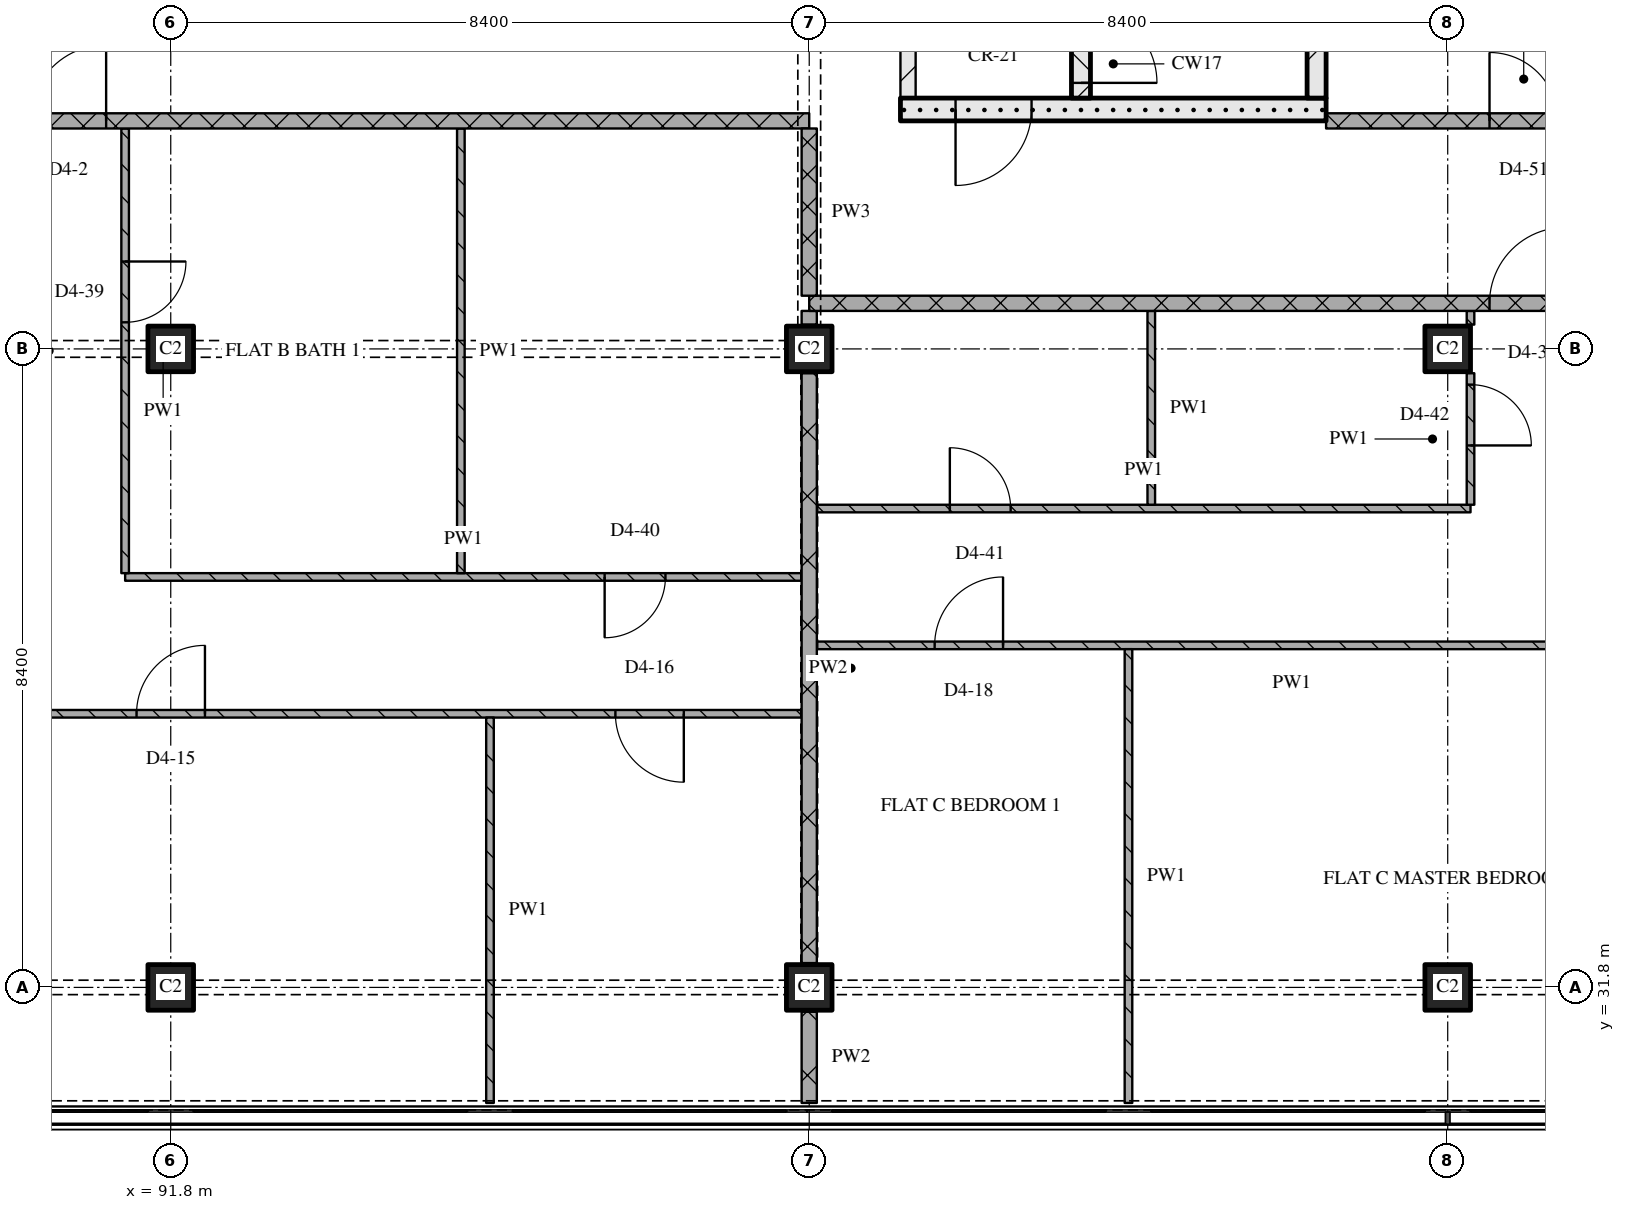
"""IFC4 building model, lengths in metres.
Left out: names, types, materials, properties, quantities, classifications, styles, units other than length and angle.
Written with IfcOpenShell. Run it as: python <this file> out.ifc"""

import sys

from ifc_helpers import new_model, si_unit, direction, frame, frame_2d, origin, origin_2d, place, context, subcontext, project, spatial, rectangle, extrude, element, fill, save


model = new_model("IFC4")
c1 = context("Model", 3, precision=1e-05, world=origin(), true_north=direction((0.0, 1.0)))
c2 = subcontext(c1, "Body", "Model", "MODEL_VIEW")
j1 = project(units=[si_unit("LENGTHUNIT", "METRE"), si_unit("PLANEANGLEUNIT", "RADIAN")], contexts=[c1])
p1 = place(None, origin())
s1 = spatial("IfcSite", under=j1, at=p1, CompositionType="ELEMENT")
p2 = place(p1, origin())
s2 = spatial("IfcBuilding", under=s1, at=p2, CompositionType="ELEMENT")
p3 = place(p2, frame((0.0, 0.0, 245.1)))
s3 = spatial("IfcBuildingStorey", under=s2, at=p3, CompositionType="ELEMENT", Elevation=245.1)
for number, where, z_axis, x_axis in (
    (1, (91.8, 31.8, 0.0), (0.0, 0.0, 1.0), (1.0, 0.0, 0.0)),
    (2, (91.8, 40.2, 0.0), (0.0, 0.0, 1.0), (1.0, 0.0, 0.0)),
    (3, (100.2, 31.8, 0.0), (0.0, 0.0, 1.0), (1.0, 0.0, 0.0)),
    (4, (100.2, 40.2, 0.0), (0.0, 0.0, 1.0), (1.0, 0.0, 0.0)),
    (5, (108.6, 31.8, 0.0), (0.0, 0.0, 1.0), (1.0, 0.0, 0.0)),
    (6, (108.6, 40.2, 0.0), (0.0, 0.0, 1.0), (1.0, 0.0, 0.0)),
):
    element("IfcColumn", number, at=place(p3, frame(where, z_axis=z_axis, x_axis=x_axis)), inside=s3, PredefinedType="COLUMN", context=c2, shape_type="SweptSolid", body=[
        extrude(rectangle(XDim=0.6, YDim=0.6, at=origin_2d()), origin(), (0.0, 0.0, 1.0), 3.6),
    ])
p4 = place(p3, frame((101.4, 43.35, 0.0), z_axis=(0.0, 0.0, 1.0), x_axis=(1.0, 0.0, 0.0)))
e7 = element("IfcWall", 7, at=p4, inside=s3, PredefinedType="SOLIDWALL", context=c2, shape_type="SweptSolid", body=[
    extrude(rectangle(XDim=5.6, YDim=0.3, at=frame_2d((2.8, 0.0))), origin(), (0.0, 0.0, 1.0), 3.32),
])
p5 = place(p4, frame((0.725, 0.0, 0.0)))
e8 = element("IfcOpeningElement", 8, at=p5, cuts=e7, PredefinedType="OPENING", context=c2, shape_type="SweptSolid", body=[
    extrude(rectangle(XDim=1.0, YDim=2.1, at=frame_2d((0.5, 1.05))), frame((0.0, 0.16, 0.0), z_axis=(0.0, -1.0, 0.0), x_axis=(1.0, 0.0, 0.0)), (0.0, 0.0, 1.0), 0.32),
])
p6 = place(p3, frame((101.5, 43.5, 0.0), z_axis=(0.0, 0.0, 1.0), x_axis=(0.0, 1.0, 0.0)))
e9 = element("IfcWall", 9, at=p6, inside=s3, PredefinedType="PARTITIONING", context=c2, shape_type="SweptSolid", body=[
    extrude(rectangle(XDim=6.9, YDim=0.2, at=frame_2d((3.45, 0.0))), origin(), (0.0, 0.0, 1.0), 3.32),
])
p7 = place(p6, frame((1.0, 0.0, 0.0)))
e10 = element("IfcOpeningElement", 10, at=p7, cuts=e9, PredefinedType="OPENING", context=c2, shape_type="SweptSolid", body=[
    extrude(rectangle(XDim=1.0, YDim=2.1, at=frame_2d((0.5, 1.05))), frame((0.0, 0.11, 0.0), z_axis=(0.0, -1.0, 0.0), x_axis=(1.0, 0.0, 0.0)), (0.0, 0.0, 1.0), 0.22),
])
p8 = place(p3, frame((103.775, 43.5, 0.0), z_axis=(0.0, 0.0, 1.0), x_axis=(0.0, 1.0, 0.0)))
e11 = element("IfcWall", 11, at=p8, inside=s3, PredefinedType="SOLIDWALL", context=c2, shape_type="SweptSolid", body=[
    extrude(rectangle(XDim=6.9, YDim=0.25, at=frame_2d((3.45, 0.0))), origin(), (0.0, 0.0, 1.0), 3.32),
])
p9 = place(p8, frame((0.2, 0.0, 0.0)))
e12 = element("IfcOpeningElement", 12, at=p9, cuts=e11, PredefinedType="OPENING", context=c2, shape_type="SweptSolid", body=[
    extrude(rectangle(XDim=1.0, YDim=2.1, at=frame_2d((0.5, 1.05))), frame((0.0, 0.135, 0.0), z_axis=(0.0, -1.0, 0.0), x_axis=(1.0, 0.0, 0.0)), (0.0, 0.0, 1.0), 0.27),
])
p10 = place(p3, frame((106.875, 43.5, 0.0), z_axis=(0.0, 0.0, 1.0), x_axis=(0.0, 1.0, 0.0)))
e13 = element("IfcWall", 13, at=p10, inside=s3, PredefinedType="SOLIDWALL", context=c2, shape_type="SweptSolid", body=[
    extrude(rectangle(XDim=6.9, YDim=0.25, at=frame_2d((3.45, 0.0))), origin(), (0.0, 0.0, 1.0), 3.32),
])
p11 = place(p3, frame((100.1, 35.4, 0.0), z_axis=(0.0, 0.0, 1.0), x_axis=(-1.0, 0.0, 0.0)))
e14 = element("IfcWall", 14, at=p11, inside=s3, PredefinedType="PARTITIONING", context=c2, shape_type="SweptSolid", body=[
    extrude(rectangle(XDim=20.9, YDim=0.1, at=frame_2d((10.45, 0.0))), origin(), (0.0, 0.0, 1.0), 3.32),
])
p12 = place(p11, frame((1.55, 0.0, 0.0)))
e15 = element("IfcOpeningElement", 15, at=p12, cuts=e14, PredefinedType="OPENING", context=c2, shape_type="SweptSolid", body=[
    extrude(rectangle(XDim=0.9, YDim=2.1, at=frame_2d((0.45, 1.05))), frame((0.0, 0.06, 0.0), z_axis=(0.0, -1.0, 0.0), x_axis=(1.0, 0.0, 0.0)), (0.0, 0.0, 1.0), 0.12),
])
p13 = place(p11, frame((7.85, 0.0, 0.0)))
e16 = element("IfcOpeningElement", 16, at=p13, cuts=e14, PredefinedType="OPENING", context=c2, shape_type="SweptSolid", body=[
    extrude(rectangle(XDim=0.9, YDim=2.1, at=frame_2d((0.45, 1.05))), frame((0.0, 0.06, 0.0), z_axis=(0.0, -1.0, 0.0), x_axis=(1.0, 0.0, 0.0)), (0.0, 0.0, 1.0), 0.12),
])
p14 = place(p11, frame((16.25, 0.0, 0.0)))
e17 = element("IfcOpeningElement", 17, at=p14, cuts=e14, PredefinedType="OPENING", context=c2, shape_type="SweptSolid", body=[
    extrude(rectangle(XDim=0.9, YDim=2.1, at=frame_2d((0.45, 1.05))), frame((0.0, 0.06, 0.0), z_axis=(0.0, -1.0, 0.0), x_axis=(1.0, 0.0, 0.0)), (0.0, 0.0, 1.0), 0.12),
])
p15 = place(p3, frame((112.8, 36.3, 0.0), z_axis=(0.0, 0.0, 1.0), x_axis=(-1.0, 0.0, 0.0)))
e18 = element("IfcWall", 18, at=p15, inside=s3, PredefinedType="PARTITIONING", context=c2, shape_type="SweptSolid", body=[
    extrude(rectangle(XDim=12.5, YDim=0.1, at=frame_2d((6.25, 0.0))), origin(), (0.0, 0.0, 1.0), 3.32),
])
p16 = place(p15, frame((10.05, 0.0, 0.0)))
e19 = element("IfcOpeningElement", 19, at=p16, cuts=e18, PredefinedType="OPENING", context=c2, shape_type="SweptSolid", body=[
    extrude(rectangle(XDim=0.9, YDim=2.1, at=frame_2d((0.45, 1.05))), frame((0.0, 0.06, 0.0), z_axis=(0.0, -1.0, 0.0), x_axis=(1.0, 0.0, 0.0)), (0.0, 0.0, 1.0), 0.12),
])
p17 = place(p3, frame((91.2, 37.2, 0.0), z_axis=(0.0, 0.0, 1.0), x_axis=(1.0, 0.0, 0.0)))
e20 = element("IfcWall", 20, at=p17, inside=s3, PredefinedType="PARTITIONING", context=c2, shape_type="SweptSolid", body=[
    extrude(rectangle(XDim=8.9, YDim=0.1, at=frame_2d((4.45, 0.0))), origin(), (0.0, 0.0, 1.0), 3.32),
])
p18 = place(p17, frame((6.308, 0.0, 0.0)))
e21 = element("IfcOpeningElement", 21, at=p18, cuts=e20, PredefinedType="OPENING", context=c2, shape_type="SweptSolid", body=[
    extrude(rectangle(XDim=0.8, YDim=2.1, at=frame_2d((0.4, 1.05))), frame((0.0, 0.06, 0.0), z_axis=(0.0, -1.0, 0.0), x_axis=(1.0, 0.0, 0.0)), (0.0, 0.0, 1.0), 0.12),
])
p19 = place(p3, frame((100.3, 38.1, 0.0), z_axis=(0.0, 0.0, 1.0), x_axis=(1.0, 0.0, 0.0)))
e22 = element("IfcWall", 22, at=p19, inside=s3, PredefinedType="PARTITIONING", context=c2, shape_type="SweptSolid", body=[
    extrude(rectangle(XDim=8.6, YDim=0.1, at=frame_2d((4.3, 0.0))), origin(), (0.0, 0.0, 1.0), 3.32),
])
p20 = place(p19, frame((1.75, 0.0, 0.0)))
e23 = element("IfcOpeningElement", 23, at=p20, cuts=e22, PredefinedType="OPENING", context=c2, shape_type="SweptSolid", body=[
    extrude(rectangle(XDim=0.8, YDim=2.1, at=frame_2d((0.4, 1.05))), frame((0.0, 0.06, 0.0), z_axis=(0.0, -1.0, 0.0), x_axis=(1.0, 0.0, 0.0)), (0.0, 0.0, 1.0), 0.12),
])
p21 = place(p3, frame((124.58, 40.8, 0.0), z_axis=(0.0, 0.0, 1.0), x_axis=(-1.0, 0.0, 0.0)))
e24 = element("IfcWall", 24, at=p21, inside=s3, PredefinedType="PARTITIONING", context=c2, shape_type="SweptSolid", body=[
    extrude(rectangle(XDim=24.38, YDim=0.2, at=frame_2d((12.19, 0.0))), origin(), (0.0, 0.0, 1.0), 3.32),
])
p22 = place(p21, frame((14.43, 0.0, 0.0)))
e25 = element("IfcOpeningElement", 25, at=p22, cuts=e24, PredefinedType="OPENING", context=c2, shape_type="SweptSolid", body=[
    extrude(rectangle(XDim=1.0, YDim=2.1, at=frame_2d((0.5, 1.05))), frame((0.0, 0.11, 0.0), z_axis=(0.0, -1.0, 0.0), x_axis=(1.0, 0.0, 0.0)), (0.0, 0.0, 1.0), 0.22),
])
p23 = place(p3, frame((100.2, 43.2, 0.0), z_axis=(0.0, 0.0, 1.0), x_axis=(-1.0, 0.0, 0.0)))
e26 = element("IfcWall", 26, at=p23, inside=s3, PredefinedType="PARTITIONING", context=c2, shape_type="SweptSolid", body=[
    extrude(rectangle(XDim=25.2, YDim=0.2, at=frame_2d((12.6, 0.0))), origin(), (0.0, 0.0, 1.0), 3.32),
])
p24 = place(p23, frame((9.25, 0.0, 0.0)))
e27 = element("IfcOpeningElement", 27, at=p24, cuts=e26, PredefinedType="OPENING", context=c2, shape_type="SweptSolid", body=[
    extrude(rectangle(XDim=1.0, YDim=2.1, at=frame_2d((0.5, 1.05))), frame((0.0, 0.11, 0.0), z_axis=(0.0, -1.0, 0.0), x_axis=(1.0, 0.0, 0.0)), (0.0, 0.0, 1.0), 0.22),
])
p25 = place(p3, frame((107.0, 43.2, 0.0), z_axis=(0.0, 0.0, 1.0), x_axis=(1.0, 0.0, 0.0)))
e28 = element("IfcWall", 28, at=p25, inside=s3, PredefinedType="PARTITIONING", context=c2, shape_type="SweptSolid", body=[
    extrude(rectangle(XDim=5.2, YDim=0.2, at=frame_2d((2.6, 0.0))), origin(), (0.0, 0.0, 1.0), 3.32),
])
p26 = place(p25, frame((2.15, 0.0, 0.0)))
e29 = element("IfcOpeningElement", 29, at=p26, cuts=e28, PredefinedType="OPENING", context=c2, shape_type="SweptSolid", body=[
    extrude(rectangle(XDim=0.9, YDim=2.1, at=frame_2d((0.45, 1.05))), frame((0.0, 0.11, 0.0), z_axis=(0.0, -1.0, 0.0), x_axis=(1.0, 0.0, 0.0)), (0.0, 0.0, 1.0), 0.22),
])
p27 = place(p3, frame((91.2, 43.1, 0.0), z_axis=(0.0, 0.0, 1.0), x_axis=(0.0, -1.0, 0.0)))
e30 = element("IfcWall", 30, at=p27, inside=s3, PredefinedType="PARTITIONING", context=c2, shape_type="SweptSolid", body=[
    extrude(rectangle(XDim=5.85, YDim=0.1, at=frame_2d((2.925, 0.0))), origin(), (0.0, 0.0, 1.0), 3.32),
])
p28 = place(p27, frame((1.75, 0.0, 0.0)))
e31 = element("IfcOpeningElement", 31, at=p28, cuts=e30, PredefinedType="OPENING", context=c2, shape_type="SweptSolid", body=[
    extrude(rectangle(XDim=0.8, YDim=2.1, at=frame_2d((0.4, 1.05))), frame((0.0, 0.06, 0.0), z_axis=(0.0, -1.0, 0.0), x_axis=(1.0, 0.0, 0.0)), (0.0, 0.0, 1.0), 0.12),
])
p29 = place(p3, frame((95.617, 43.1, 0.0), z_axis=(0.0, 0.0, 1.0), x_axis=(0.0, -1.0, 0.0)))
e32 = element("IfcWall", 32, at=p29, inside=s3, PredefinedType="PARTITIONING", context=c2, shape_type="SweptSolid", body=[
    extrude(rectangle(XDim=5.85, YDim=0.1, at=frame_2d((2.925, 0.0))), origin(), (0.0, 0.0, 1.0), 3.32),
])
p30 = place(p3, frame((96.0, 35.35, 0.0), z_axis=(0.0, 0.0, 1.0), x_axis=(0.0, -1.0, 0.0)))
e33 = element("IfcWall", 33, at=p30, inside=s3, PredefinedType="PARTITIONING", context=c2, shape_type="SweptSolid", body=[
    extrude(rectangle(XDim=5.07, YDim=0.1, at=frame_2d((2.535, 0.0))), origin(), (0.0, 0.0, 1.0), 3.32),
])
p31 = place(p3, frame((100.2, 43.1, 0.0), z_axis=(0.0, 0.0, 1.0), x_axis=(0.0, -1.0, 0.0)))
e34 = element("IfcWall", 34, at=p31, inside=s3, PredefinedType="PARTITIONING", context=c2, shape_type="SweptSolid", body=[
    extrude(rectangle(XDim=2.2, YDim=0.2, at=frame_2d((1.1, 0.0))), origin(), (0.0, 0.0, 1.0), 2.53),
])
p32 = place(p3, frame((100.2, 31.48, 0.0), z_axis=(0.0, 0.0, 1.0), x_axis=(0.0, -1.0, 0.0)))
e35 = element("IfcWall", 35, at=p32, inside=s3, PredefinedType="PARTITIONING", context=c2, shape_type="SweptSolid", body=[
    extrude(rectangle(XDim=1.2, YDim=0.2, at=frame_2d((0.6, 0.0))), origin(), (0.0, 0.0, 1.0), 3.32),
])
p33 = place(p3, frame((100.2, 39.88, 0.0), z_axis=(0.0, 0.0, 1.0), x_axis=(0.0, -1.0, 0.0)))
e36 = element("IfcWall", 36, at=p33, inside=s3, PredefinedType="PARTITIONING", context=c2, shape_type="SweptSolid", body=[
    extrude(rectangle(XDim=7.76, YDim=0.2, at=frame_2d((3.88, 0.0))), origin(), (0.0, 0.0, 1.0), 2.72),
])
p34 = place(p3, frame((100.2, 40.7, 0.0), z_axis=(0.0, 0.0, 1.0), x_axis=(0.0, -1.0, 0.0)))
e37 = element("IfcWall", 37, at=p34, inside=s3, PredefinedType="PARTITIONING", context=c2, shape_type="SweptSolid", body=[
    extrude(rectangle(XDim=0.18, YDim=0.2, at=frame_2d((0.09, 0.0))), origin(), (0.0, 0.0, 1.0), 3.32),
])
p35 = place(p3, frame((104.4, 36.25, 0.0), z_axis=(0.0, 0.0, 1.0), x_axis=(0.0, -1.0, 0.0)))
e38 = element("IfcWall", 38, at=p35, inside=s3, PredefinedType="PARTITIONING", context=c2, shape_type="SweptSolid", body=[
    extrude(rectangle(XDim=5.97, YDim=0.1, at=frame_2d((2.985, 0.0))), origin(), (0.0, 0.0, 1.0), 3.32),
])
p36 = place(p3, frame((104.7, 40.7, 0.0), z_axis=(0.0, 0.0, 1.0), x_axis=(0.0, -1.0, 0.0)))
e39 = element("IfcWall", 39, at=p36, inside=s3, PredefinedType="PARTITIONING", context=c2, shape_type="SweptSolid", body=[
    extrude(rectangle(XDim=2.55, YDim=0.1, at=frame_2d((1.275, 0.0))), origin(), (0.0, 0.0, 1.0), 3.32),
])
p37 = place(p3, frame((108.9, 38.15, 0.0), z_axis=(0.0, 0.0, 1.0), x_axis=(0.0, 1.0, 0.0)))
e40 = element("IfcWall", 40, at=p37, inside=s3, PredefinedType="PARTITIONING", context=c2, shape_type="SweptSolid", body=[
    extrude(rectangle(XDim=1.73, YDim=0.1, at=frame_2d((0.865, 0.0))), origin(), (0.0, 0.0, 1.0), 3.32),
])
p38 = place(p37, frame((0.78, 0.0, 0.0)))
e41 = element("IfcOpeningElement", 41, at=p38, cuts=e40, PredefinedType="OPENING", context=c2, shape_type="SweptSolid", body=[
    extrude(rectangle(XDim=0.8, YDim=2.1, at=frame_2d((0.4, 1.05))), frame((0.0, 0.06, 0.0), z_axis=(0.0, -1.0, 0.0), x_axis=(1.0, 0.0, 0.0)), (0.0, 0.0, 1.0), 0.12),
])
p39 = place(p3, frame((108.9, 40.7, 0.0), z_axis=(0.0, 0.0, 1.0), x_axis=(0.0, -1.0, 0.0)))
e42 = element("IfcWall", 42, at=p39, inside=s3, PredefinedType="PARTITIONING", context=c2, shape_type="SweptSolid", body=[
    extrude(rectangle(XDim=0.18, YDim=0.1, at=frame_2d((0.09, 0.0))), origin(), (0.0, 0.0, 1.0), 3.32),
])
p40 = place(p5, origin())
e43 = element("IfcDoor", 43, at=p40, inside=s3, OperationType="SINGLE_SWING_RIGHT", PredefinedType="DOOR", context=c2, shape_type="SweptSolid", body=[
    extrude(rectangle(XDim=1.0, YDim=2.1, at=frame_2d((0.5, 1.05))), frame((0.0, 0.025, 0.0), z_axis=(0.0, -1.0, 0.0), x_axis=(1.0, 0.0, 0.0)), (0.0, 0.0, 1.0), 0.05),
])
fill(e8, e43)
p41 = place(p9, origin())
e44 = element("IfcDoor", 44, at=p41, inside=s3, OperationType="SINGLE_SWING_RIGHT", PredefinedType="DOOR", context=c2, shape_type="SweptSolid", body=[
    extrude(rectangle(XDim=1.0, YDim=2.1, at=frame_2d((0.5, 1.05))), frame((0.0, 0.025, 0.0), z_axis=(0.0, -1.0, 0.0), x_axis=(1.0, 0.0, 0.0)), (0.0, 0.0, 1.0), 0.05),
])
fill(e12, e44)
p42 = place(p12, origin())
e45 = element("IfcDoor", 45, at=p42, inside=s3, OperationType="SINGLE_SWING_LEFT", PredefinedType="DOOR", context=c2, shape_type="SweptSolid", body=[
    extrude(rectangle(XDim=0.9, YDim=2.1, at=frame_2d((0.45, 1.05))), frame((0.0, 0.025, 0.0), z_axis=(0.0, -1.0, 0.0), x_axis=(1.0, 0.0, 0.0)), (0.0, 0.0, 1.0), 0.05),
])
fill(e15, e45)
p43 = place(p13, origin())
e46 = element("IfcDoor", 46, at=p43, inside=s3, OperationType="SINGLE_SWING_RIGHT", PredefinedType="DOOR", context=c2, shape_type="SweptSolid", body=[
    extrude(rectangle(XDim=0.9, YDim=2.1, at=frame_2d((0.45, 1.05))), frame((0.0, 0.025, 0.0), z_axis=(0.0, -1.0, 0.0), x_axis=(1.0, 0.0, 0.0)), (0.0, 0.0, 1.0), 0.05),
])
fill(e16, e46)
p44 = place(p16, origin())
e47 = element("IfcDoor", 47, at=p44, inside=s3, OperationType="SINGLE_SWING_RIGHT", PredefinedType="DOOR", context=c2, shape_type="SweptSolid", body=[
    extrude(rectangle(XDim=0.9, YDim=2.1, at=frame_2d((0.45, 1.05))), frame((0.0, 0.025, 0.0), z_axis=(0.0, -1.0, 0.0), x_axis=(1.0, 0.0, 0.0)), (0.0, 0.0, 1.0), 0.05),
])
fill(e19, e47)
p45 = place(p18, origin())
e48 = element("IfcDoor", 48, at=p45, inside=s3, OperationType="SINGLE_SWING_RIGHT", PredefinedType="DOOR", context=c2, shape_type="SweptSolid", body=[
    extrude(rectangle(XDim=0.8, YDim=2.1, at=frame_2d((0.4, 1.05))), frame((0.0, 0.025, 0.0), z_axis=(0.0, -1.0, 0.0), x_axis=(1.0, 0.0, 0.0)), (0.0, 0.0, 1.0), 0.05),
])
fill(e21, e48)
p46 = place(p20, origin())
e49 = element("IfcDoor", 49, at=p46, inside=s3, OperationType="SINGLE_SWING_LEFT", PredefinedType="DOOR", context=c2, shape_type="SweptSolid", body=[
    extrude(rectangle(XDim=0.8, YDim=2.1, at=frame_2d((0.4, 1.05))), frame((0.0, 0.025, 0.0), z_axis=(0.0, -1.0, 0.0), x_axis=(1.0, 0.0, 0.0)), (0.0, 0.0, 1.0), 0.05),
])
fill(e23, e49)
p47 = place(p22, origin())
e50 = element("IfcDoor", 50, at=p47, inside=s3, OperationType="SINGLE_SWING_RIGHT", PredefinedType="DOOR", context=c2, shape_type="SweptSolid", body=[
    extrude(rectangle(XDim=1.0, YDim=2.1, at=frame_2d((0.5, 1.05))), frame((0.0, 0.025, 0.0), z_axis=(0.0, -1.0, 0.0), x_axis=(1.0, 0.0, 0.0)), (0.0, 0.0, 1.0), 0.05),
])
fill(e25, e50)
p48 = place(p24, origin())
e51 = element("IfcDoor", 51, at=p48, inside=s3, OperationType="SINGLE_SWING_RIGHT", PredefinedType="DOOR", context=c2, shape_type="SweptSolid", body=[
    extrude(rectangle(XDim=1.0, YDim=2.1, at=frame_2d((0.5, 1.05))), frame((0.0, 0.025, 0.0), z_axis=(0.0, -1.0, 0.0), x_axis=(1.0, 0.0, 0.0)), (0.0, 0.0, 1.0), 0.05),
])
fill(e27, e51)
p49 = place(p26, origin())
e52 = element("IfcDoor", 52, at=p49, inside=s3, OperationType="SINGLE_SWING_LEFT", PredefinedType="DOOR", context=c2, shape_type="SweptSolid", body=[
    extrude(rectangle(XDim=0.9, YDim=2.1, at=frame_2d((0.45, 1.05))), frame((0.0, 0.025, 0.0), z_axis=(0.0, -1.0, 0.0), x_axis=(1.0, 0.0, 0.0)), (0.0, 0.0, 1.0), 0.05),
])
fill(e29, e52)
p50 = place(p28, origin())
e53 = element("IfcDoor", 53, at=p50, inside=s3, OperationType="SINGLE_SWING_LEFT", PredefinedType="DOOR", context=c2, shape_type="SweptSolid", body=[
    extrude(rectangle(XDim=0.8, YDim=2.1, at=frame_2d((0.4, 1.05))), frame((0.0, 0.025, 0.0), z_axis=(0.0, -1.0, 0.0), x_axis=(1.0, 0.0, 0.0)), (0.0, 0.0, 1.0), 0.05),
])
fill(e31, e53)
p51 = place(p38, origin())
e54 = element("IfcDoor", 54, at=p51, inside=s3, OperationType="SINGLE_SWING_RIGHT", PredefinedType="DOOR", context=c2, shape_type="SweptSolid", body=[
    extrude(rectangle(XDim=0.8, YDim=2.1, at=frame_2d((0.4, 1.05))), frame((0.0, 0.025, 0.0), z_axis=(0.0, -1.0, 0.0), x_axis=(1.0, 0.0, 0.0)), (0.0, 0.0, 1.0), 0.05),
])
fill(e41, e54)
save(model, sys.argv[1])
